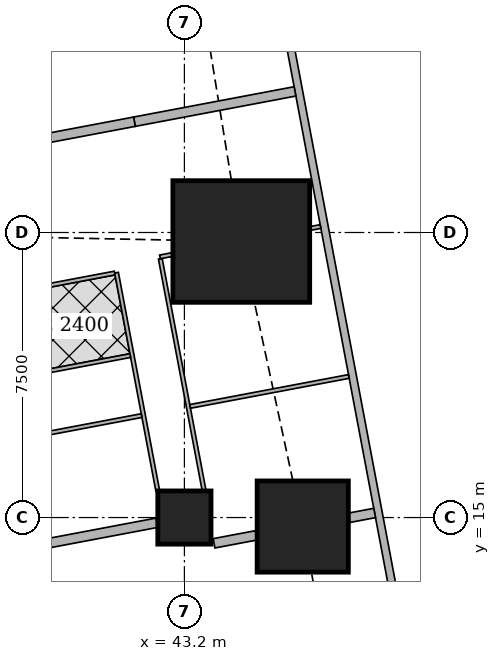
"""IFC4 building model, lengths in metres.
Left out: names, types, materials, properties, quantities, classifications, styles, units other than length and angle.
Written with IfcOpenShell. Run it as: python <this file> out.ifc"""

import sys

from ifc_helpers import new_model, si_unit, direction, frame, frame_2d, origin, origin_2d, place, context, subcontext, project, spatial, rectangle, extrude, element, fill, save


model = new_model("IFC4")
c1 = context("Model", 3, precision=1e-05, world=origin(), true_north=direction((0.0, 1.0)))
c2 = subcontext(c1, "Body", "Model", "MODEL_VIEW")
j1 = project(units=[si_unit("LENGTHUNIT", "METRE"), si_unit("PLANEANGLEUNIT", "RADIAN")], contexts=[c1])
p1 = place(None, origin())
s1 = spatial("IfcSite", under=j1, at=p1, CompositionType="ELEMENT")
p2 = place(p1, origin())
s2 = spatial("IfcBuilding", under=s1, at=p2, CompositionType="ELEMENT")
p3 = place(p2, frame((0.0, 0.0, 193.7)))
s3 = spatial("IfcBuildingStorey", under=s2, at=p3, CompositionType="ELEMENT", Elevation=193.7)
p4 = place(p3, frame((43.2, 15.0, 0.0), z_axis=(0.0, 0.0, 1.0), x_axis=(1.0, 0.0, 0.0)))
e1 = element("IfcColumn", 1, at=p4, inside=s3, PredefinedType="COLUMN", context=c2, shape_type="SweptSolid", body=[
    extrude(rectangle(XDim=1.4, YDim=1.4, at=origin_2d()), origin(), (0.0, 0.0, 1.0), 3.75),
])
p5 = place(p3, frame((46.314, 14.763, 0.0), z_axis=(0.0, 0.0, 1.0), x_axis=(1.0, 0.0, 0.0)))
e2 = element("IfcColumn", 2, at=p5, inside=s3, PredefinedType="COLUMN", context=c2, shape_type="SweptSolid", body=[
    extrude(rectangle(XDim=2.4, YDim=2.4, at=origin_2d()), origin(), (0.0, 0.0, 1.0), 3.75),
])
p6 = place(p3, frame((44.697, 22.263, 0.0), z_axis=(0.0, 0.0, 1.0), x_axis=(1.0, 0.0, 0.0)))
e3 = element("IfcColumn", 3, at=p6, inside=s3, PredefinedType="COLUMN", context=c2, shape_type="SweptSolid", body=[
    extrude(rectangle(XDim=3.6, YDim=3.2, at=origin_2d()), origin(), (0.0, 0.0, 1.0), 3.75),
])
p7 = place(p3, frame((50.653, 2.703, 0.0), z_axis=(0.0, 0.0, 1.0), x_axis=(-0.185612026696, 0.982623109613, 0.0)))
e4 = element("IfcWall", 4, at=p7, inside=s3, PredefinedType="SOLIDWALL", context=c2, shape_type="SweptSolid", body=[
    extrude(rectangle(XDim=41.393, YDim=0.2, at=frame_2d((20.697, 0.0))), origin(), (0.0, 0.0, 1.0), 3.5),
])
p8 = place(p7, frame((1.633, 0.0, 0.9)))
e5 = element("IfcOpeningElement", 5, at=p8, cuts=e4, PredefinedType="OPENING", context=c2, shape_type="SweptSolid", body=[
    extrude(rectangle(XDim=1.8, YDim=1.5, at=frame_2d((0.9, 0.75))), frame((0.0, 0.11, 0.0), z_axis=(0.0, -1.0, 0.0), x_axis=(1.0, 0.0, 0.0)), (0.0, 0.0, 1.0), 0.22),
])
p9 = place(p7, frame((6.032, 0.0, 0.9)))
e6 = element("IfcOpeningElement", 6, at=p9, cuts=e4, PredefinedType="OPENING", context=c2, shape_type="SweptSolid", body=[
    extrude(rectangle(XDim=1.8, YDim=1.5, at=frame_2d((0.9, 0.75))), frame((0.0, 0.11, 0.0), z_axis=(0.0, -1.0, 0.0), x_axis=(1.0, 0.0, 0.0)), (0.0, 0.0, 1.0), 0.22),
])
p10 = place(p7, frame((9.848, 0.0, 0.9)))
e7 = element("IfcOpeningElement", 7, at=p10, cuts=e4, PredefinedType="OPENING", context=c2, shape_type="SweptSolid", body=[
    extrude(rectangle(XDim=1.8, YDim=1.5, at=frame_2d((0.9, 0.75))), frame((0.0, 0.11, 0.0), z_axis=(0.0, -1.0, 0.0), x_axis=(1.0, 0.0, 0.0)), (0.0, 0.0, 1.0), 0.22),
])
p11 = place(p7, frame((13.664, 0.0, 0.9)))
e8 = element("IfcOpeningElement", 8, at=p11, cuts=e4, PredefinedType="OPENING", context=c2, shape_type="SweptSolid", body=[
    extrude(rectangle(XDim=1.8, YDim=1.5, at=frame_2d((0.9, 0.75))), frame((0.0, 0.11, 0.0), z_axis=(0.0, -1.0, 0.0), x_axis=(1.0, 0.0, 0.0)), (0.0, 0.0, 1.0), 0.22),
])
p12 = place(p7, frame((17.481, 0.0, 0.9)))
e9 = element("IfcOpeningElement", 9, at=p12, cuts=e4, PredefinedType="OPENING", context=c2, shape_type="SweptSolid", body=[
    extrude(rectangle(XDim=1.8, YDim=1.5, at=frame_2d((0.9, 0.75))), frame((0.0, 0.11, 0.0), z_axis=(0.0, -1.0, 0.0), x_axis=(1.0, 0.0, 0.0)), (0.0, 0.0, 1.0), 0.22),
])
p13 = place(p7, frame((21.297, 0.0, 0.9)))
e10 = element("IfcOpeningElement", 10, at=p13, cuts=e4, PredefinedType="OPENING", context=c2, shape_type="SweptSolid", body=[
    extrude(rectangle(XDim=1.8, YDim=1.5, at=frame_2d((0.9, 0.75))), frame((0.0, 0.11, 0.0), z_axis=(0.0, -1.0, 0.0), x_axis=(1.0, 0.0, 0.0)), (0.0, 0.0, 1.0), 0.22),
])
p14 = place(p7, frame((25.113, 0.0, 0.9)))
e11 = element("IfcOpeningElement", 11, at=p14, cuts=e4, PredefinedType="OPENING", context=c2, shape_type="SweptSolid", body=[
    extrude(rectangle(XDim=1.8, YDim=1.5, at=frame_2d((0.9, 0.75))), frame((0.0, 0.11, 0.0), z_axis=(0.0, -1.0, 0.0), x_axis=(1.0, 0.0, 0.0)), (0.0, 0.0, 1.0), 0.22),
])
p15 = place(p7, frame((28.93, 0.0, 0.9)))
e12 = element("IfcOpeningElement", 12, at=p15, cuts=e4, PredefinedType="OPENING", context=c2, shape_type="SweptSolid", body=[
    extrude(rectangle(XDim=1.8, YDim=1.5, at=frame_2d((0.9, 0.75))), frame((0.0, 0.11, 0.0), z_axis=(0.0, -1.0, 0.0), x_axis=(1.0, 0.0, 0.0)), (0.0, 0.0, 1.0), 0.22),
])
p16 = place(p7, frame((32.746, 0.0, 0.9)))
e13 = element("IfcOpeningElement", 13, at=p16, cuts=e4, PredefinedType="OPENING", context=c2, shape_type="SweptSolid", body=[
    extrude(rectangle(XDim=1.8, YDim=1.5, at=frame_2d((0.9, 0.75))), frame((0.0, 0.11, 0.0), z_axis=(0.0, -1.0, 0.0), x_axis=(1.0, 0.0, 0.0)), (0.0, 0.0, 1.0), 0.22),
])
p17 = place(p7, frame((36.481, 0.0, 0.9)))
e14 = element("IfcOpeningElement", 14, at=p17, cuts=e4, PredefinedType="OPENING", context=c2, shape_type="SweptSolid", body=[
    extrude(rectangle(XDim=1.8, YDim=1.5, at=frame_2d((0.9, 0.75))), frame((0.0, 0.11, 0.0), z_axis=(0.0, -1.0, 0.0), x_axis=(1.0, 0.0, 0.0)), (0.0, 0.0, 1.0), 0.22),
])
p18 = place(p3, frame((33.933, 42.73, 0.0), z_axis=(0.0, 0.0, 1.0), x_axis=(0.185595417643, -0.982626246825, 0.0)))
e15 = element("IfcWall", 15, at=p18, inside=s3, PredefinedType="SOLIDWALL", context=c2, shape_type="SweptSolid", body=[
    extrude(rectangle(XDim=41.051, YDim=0.15, at=frame_2d((20.525, 0.0))), origin(), (0.0, 0.0, 1.0), 2.5),
])
p19 = place(p18, frame((16.082, 0.0, 0.0)))
e16 = element("IfcOpeningElement", 16, at=p19, cuts=e15, PredefinedType="OPENING", context=c2, shape_type="SweptSolid", body=[
    extrude(rectangle(XDim=1.0, YDim=2.1, at=frame_2d((0.5, 1.05))), frame((0.0, 0.085, 0.0), z_axis=(0.0, -1.0, 0.0), x_axis=(1.0, 0.0, 0.0)), (0.0, 0.0, 1.0), 0.17),
])
p20 = place(p18, frame((19.898, 0.0, 0.0)))
e17 = element("IfcOpeningElement", 17, at=p20, cuts=e15, PredefinedType="OPENING", context=c2, shape_type="SweptSolid", body=[
    extrude(rectangle(XDim=1.0, YDim=2.1, at=frame_2d((0.5, 1.05))), frame((0.0, 0.085, 0.0), z_axis=(0.0, -1.0, 0.0), x_axis=(1.0, 0.0, 0.0)), (0.0, 0.0, 1.0), 0.17),
])
p21 = place(p18, frame((30.862, 0.0, 0.0)))
e18 = element("IfcOpeningElement", 18, at=p21, cuts=e15, PredefinedType="OPENING", context=c2, shape_type="SweptSolid", body=[
    extrude(rectangle(XDim=1.0, YDim=2.1, at=frame_2d((0.5, 1.05))), frame((0.0, 0.085, 0.0), z_axis=(0.0, -1.0, 0.0), x_axis=(1.0, 0.0, 0.0)), (0.0, 0.0, 1.0), 0.17),
])
p22 = place(p3, frame((42.566, 21.809, 0.0), z_axis=(0.0, 0.0, 1.0), x_axis=(0.185613526435, -0.98262282632, 0.0)))
e19 = element("IfcWall", 19, at=p22, inside=s3, PredefinedType="PARTITIONING", context=c2, shape_type="SweptSolid", body=[
    extrude(rectangle(XDim=6.207, YDim=0.1, at=frame_2d((3.104, 0.0))), origin(), (0.0, 0.0, 1.0), 2.5),
])
p23 = place(p22, frame((1.45, 0.0, 0.0)))
e20 = element("IfcOpeningElement", 20, at=p23, cuts=e19, PredefinedType="OPENING", context=c2, shape_type="SweptSolid", body=[
    extrude(rectangle(XDim=0.9, YDim=2.1, at=frame_2d((0.45, 1.05))), frame((0.0, 0.06, 0.0), z_axis=(0.0, -1.0, 0.0), x_axis=(1.0, 0.0, 0.0)), (0.0, 0.0, 1.0), 0.12),
])
p24 = place(p22, frame((4.163, 0.0, 0.0)))
e21 = element("IfcOpeningElement", 21, at=p24, cuts=e19, PredefinedType="OPENING", context=c2, shape_type="SweptSolid", body=[
    extrude(rectangle(XDim=0.9, YDim=2.1, at=frame_2d((0.45, 1.05))), frame((0.0, 0.06, 0.0), z_axis=(0.0, -1.0, 0.0), x_axis=(1.0, 0.0, 0.0)), (0.0, 0.0, 1.0), 0.12),
])
p25 = place(p3, frame((41.414, 21.442, 0.0), z_axis=(0.0, 0.0, 1.0), x_axis=(0.185698675093, -0.982606738257, 0.0)))
e22 = element("IfcWall", 22, at=p25, inside=s3, PredefinedType="PARTITIONING", context=c2, shape_type="SweptSolid", body=[
    extrude(rectangle(XDim=5.843, YDim=0.1, at=frame_2d((2.921, 0.0))), origin(), (0.0, 0.0, 1.0), 3.5),
])
p26 = place(p25, frame((0.655, 0.0, 0.0)))
e23 = element("IfcOpeningElement", 23, at=p26, cuts=e22, PredefinedType="OPENING", context=c2, shape_type="SweptSolid", body=[
    extrude(rectangle(XDim=0.9, YDim=2.1, at=frame_2d((0.45, 1.05))), frame((0.0, 0.06, 0.0), z_axis=(0.0, -1.0, 0.0), x_axis=(1.0, 0.0, 0.0)), (0.0, 0.0, 1.0), 0.12),
])
p27 = place(p25, frame((2.563, 0.0, 0.0)))
e24 = element("IfcOpeningElement", 24, at=p27, cuts=e22, PredefinedType="OPENING", context=c2, shape_type="SweptSolid", body=[
    extrude(rectangle(XDim=0.9, YDim=2.1, at=frame_2d((0.45, 1.05))), frame((0.0, 0.06, 0.0), z_axis=(0.0, -1.0, 0.0), x_axis=(1.0, 0.0, 0.0)), (0.0, 0.0, 1.0), 0.12),
])
p28 = place(p3, frame((46.782, 22.657, 0.0), z_axis=(0.0, 0.0, 1.0), x_axis=(-0.982574553168, -0.185868898601, 0.0)))
e25 = element("IfcWall", 25, at=p28, inside=s3, PredefinedType="PARTITIONING", context=c2, shape_type="SweptSolid", body=[
    extrude(rectangle(XDim=0.28, YDim=0.1, at=frame_2d((0.14, 0.0))), origin(), (0.0, 0.0, 1.0), 3.5),
])
p29 = place(p3, frame((42.887, 21.921, 0.0), z_axis=(0.0, 0.0, 1.0), x_axis=(-0.982274918032, -0.187445953293, 0.0)))
e26 = element("IfcWall", 26, at=p29, inside=s3, PredefinedType="PARTITIONING", context=c2, shape_type="SweptSolid", body=[
    extrude(rectangle(XDim=0.336, YDim=0.1, at=frame_2d((0.168, 0.0))), origin(), (0.0, 0.0, 1.0), 2.5),
])
p30 = place(p3, frame((47.527, 18.712, 0.0), z_axis=(0.0, 0.0, 1.0), x_axis=(-0.982665405803, -0.185387972203, 0.0)))
e27 = element("IfcWall", 27, at=p30, inside=s3, PredefinedType="PARTITIONING", context=c2, shape_type="SweptSolid", body=[
    extrude(rectangle(XDim=4.25, YDim=0.1, at=frame_2d((2.125, 0.0))), origin(), (0.0, 0.0, 1.0), 2.05),
])
p31 = place(p3, frame((41.365, 21.433, 0.0), z_axis=(0.0, 0.0, 1.0), x_axis=(-0.982607026909, -0.185697147715, 0.0)))
e28 = element("IfcWall", 28, at=p31, inside=s3, PredefinedType="PARTITIONING", context=c2, shape_type="SweptSolid", body=[
    extrude(rectangle(XDim=3.275, YDim=0.1, at=frame_2d((1.637, 0.0))), origin(), (0.0, 0.0, 1.0), 3.5),
])
p32 = place(p3, frame((42.073, 17.682, 0.0), z_axis=(0.0, 0.0, 1.0), x_axis=(-0.982620626894, -0.185625169636, 0.0)))
e29 = element("IfcWall", 29, at=p32, inside=s3, PredefinedType="PARTITIONING", context=c2, shape_type="SweptSolid", body=[
    extrude(rectangle(XDim=3.275, YDim=0.1, at=frame_2d((1.637, 0.0))), origin(), (0.0, 0.0, 1.0), 3.5),
])
p33 = place(p32, frame((1.2, 0.0, 0.0)))
e30 = element("IfcOpeningElement", 30, at=p33, cuts=e29, PredefinedType="OPENING", context=c2, shape_type="SweptSolid", body=[
    extrude(rectangle(XDim=0.9, YDim=2.1, at=frame_2d((0.45, 1.05))), frame((0.0, 0.06, 0.0), z_axis=(0.0, -1.0, 0.0), x_axis=(1.0, 0.0, 0.0)), (0.0, 0.0, 1.0), 0.12),
])
p34 = place(p3, frame((41.775, 19.261, 0.0), z_axis=(0.0, 0.0, 1.0), x_axis=(-0.982620626894, -0.185625169636, 0.0)))
e31 = element("IfcWall", 31, at=p34, inside=s3, PredefinedType="PARTITIONING", context=c2, shape_type="SweptSolid", body=[
    extrude(rectangle(XDim=3.275, YDim=0.1, at=frame_2d((1.637, 0.0))), origin(), (0.0, 0.0, 1.0), 3.5),
])
p35 = place(p3, frame((46.11, 26.213, 0.0), z_axis=(0.0, 0.0, 1.0), x_axis=(-0.982633535512, -0.185556823879, 0.0)))
e32 = element("IfcWall", 32, at=p35, inside=s3, PredefinedType="SOLIDWALL", context=c2, shape_type="SweptSolid", body=[
    extrude(rectangle(XDim=4.3, YDim=0.25, at=frame_2d((2.15, 0.0))), origin(), (0.0, 0.0, 1.0), 2.05),
])
p36 = place(p3, frame((41.885, 25.415, 0.0), z_axis=(0.0, 0.0, 1.0), x_axis=(-0.982612837616, -0.185666398014, 0.0)))
e33 = element("IfcWall", 33, at=p36, inside=s3, PredefinedType="SOLIDWALL", context=c2, shape_type="SweptSolid", body=[
    extrude(rectangle(XDim=4.525, YDim=0.25, at=frame_2d((2.262, 0.0))), origin(), (0.0, 0.0, 1.0), 3.5),
])
p37 = place(p3, frame((48.206, 15.12, 0.0), z_axis=(0.0, 0.0, 1.0), x_axis=(-0.982610999048, -0.18567612811, 0.0)))
e34 = element("IfcWall", 34, at=p37, inside=s3, PredefinedType="SOLIDWALL", context=c2, shape_type="SweptSolid", body=[
    extrude(rectangle(XDim=0.68, YDim=0.25, at=frame_2d((0.34, 0.0))), origin(), (0.0, 0.0, 1.0), 2.05),
])
p38 = place(p3, frame((45.09, 14.531, 0.0), z_axis=(0.0, 0.0, 1.0), x_axis=(-0.982737354171, -0.185006196431, 0.0)))
e35 = element("IfcWall", 35, at=p38, inside=s3, PredefinedType="SOLIDWALL", context=c2, shape_type="SweptSolid", body=[
    extrude(rectangle(XDim=1.13, YDim=0.25, at=frame_2d((0.565, 0.0))), origin(), (0.0, 0.0, 1.0), 2.05),
])
p39 = place(p3, frame((42.476, 14.863, 0.0), z_axis=(0.0, 0.0, 1.0), x_axis=(-0.982638716117, -0.185529387398, 0.0)))
e36 = element("IfcWall", 36, at=p39, inside=s3, PredefinedType="SOLIDWALL", context=c2, shape_type="SweptSolid", body=[
    extrude(rectangle(XDim=3.148, YDim=0.25, at=frame_2d((1.574, 0.0))), origin(), (0.0, 0.0, 1.0), 3.5),
])
p40 = place(p10, origin())
e37 = element("IfcWindow", 37, at=p40, inside=s3, PartitioningType="SINGLE_PANEL", PredefinedType="WINDOW", context=c2, shape_type="SweptSolid", body=[
    extrude(rectangle(XDim=1.8, YDim=1.5, at=frame_2d((0.9, 0.75))), frame((0.0, 0.03, 0.0), z_axis=(0.0, -1.0, 0.0), x_axis=(1.0, 0.0, 0.0)), (0.0, 0.0, 1.0), 0.06),
])
fill(e7, e37)
p41 = place(p11, origin())
e38 = element("IfcWindow", 38, at=p41, inside=s3, PartitioningType="SINGLE_PANEL", PredefinedType="WINDOW", context=c2, shape_type="SweptSolid", body=[
    extrude(rectangle(XDim=1.8, YDim=1.5, at=frame_2d((0.9, 0.75))), frame((0.0, 0.03, 0.0), z_axis=(0.0, -1.0, 0.0), x_axis=(1.0, 0.0, 0.0)), (0.0, 0.0, 1.0), 0.06),
])
fill(e8, e38)
p42 = place(p12, origin())
e39 = element("IfcWindow", 39, at=p42, inside=s3, PartitioningType="SINGLE_PANEL", PredefinedType="WINDOW", context=c2, shape_type="SweptSolid", body=[
    extrude(rectangle(XDim=1.8, YDim=1.5, at=frame_2d((0.9, 0.75))), frame((0.0, 0.03, 0.0), z_axis=(0.0, -1.0, 0.0), x_axis=(1.0, 0.0, 0.0)), (0.0, 0.0, 1.0), 0.06),
])
fill(e9, e39)
p43 = place(p13, origin())
e40 = element("IfcWindow", 40, at=p43, inside=s3, PartitioningType="SINGLE_PANEL", PredefinedType="WINDOW", context=c2, shape_type="SweptSolid", body=[
    extrude(rectangle(XDim=1.8, YDim=1.5, at=frame_2d((0.9, 0.75))), frame((0.0, 0.03, 0.0), z_axis=(0.0, -1.0, 0.0), x_axis=(1.0, 0.0, 0.0)), (0.0, 0.0, 1.0), 0.06),
])
fill(e10, e40)
p44 = place(p23, origin())
e41 = element("IfcDoor", 41, at=p44, inside=s3, OperationType="SINGLE_SWING_LEFT", PredefinedType="DOOR", context=c2, shape_type="SweptSolid", body=[
    extrude(rectangle(XDim=0.9, YDim=2.1, at=frame_2d((0.45, 1.05))), frame((0.0, 0.025, 0.0), z_axis=(0.0, -1.0, 0.0), x_axis=(1.0, 0.0, 0.0)), (0.0, 0.0, 1.0), 0.05),
])
fill(e20, e41)
p45 = place(p24, origin())
e42 = element("IfcDoor", 42, at=p45, inside=s3, OperationType="SINGLE_SWING_LEFT", PredefinedType="DOOR", context=c2, shape_type="SweptSolid", body=[
    extrude(rectangle(XDim=0.9, YDim=2.1, at=frame_2d((0.45, 1.05))), frame((0.0, 0.025, 0.0), z_axis=(0.0, -1.0, 0.0), x_axis=(1.0, 0.0, 0.0)), (0.0, 0.0, 1.0), 0.05),
])
fill(e21, e42)
p46 = place(p26, origin())
e43 = element("IfcDoor", 43, at=p46, inside=s3, OperationType="SINGLE_SWING_RIGHT", PredefinedType="DOOR", context=c2, shape_type="SweptSolid", body=[
    extrude(rectangle(XDim=0.9, YDim=2.1, at=frame_2d((0.45, 1.05))), frame((0.0, 0.025, 0.0), z_axis=(0.0, -1.0, 0.0), x_axis=(1.0, 0.0, 0.0)), (0.0, 0.0, 1.0), 0.05),
])
fill(e23, e43)
p47 = place(p27, origin())
e44 = element("IfcDoor", 44, at=p47, inside=s3, OperationType="SINGLE_SWING_LEFT", PredefinedType="DOOR", context=c2, shape_type="SweptSolid", body=[
    extrude(rectangle(XDim=0.9, YDim=2.1, at=frame_2d((0.45, 1.05))), frame((0.0, 0.025, 0.0), z_axis=(0.0, -1.0, 0.0), x_axis=(1.0, 0.0, 0.0)), (0.0, 0.0, 1.0), 0.05),
])
fill(e24, e44)
p48 = place(p33, origin())
e45 = element("IfcDoor", 45, at=p48, inside=s3, OperationType="SINGLE_SWING_LEFT", PredefinedType="DOOR", context=c2, shape_type="SweptSolid", body=[
    extrude(rectangle(XDim=0.9, YDim=2.1, at=frame_2d((0.45, 1.05))), frame((0.0, 0.025, 0.0), z_axis=(0.0, -1.0, 0.0), x_axis=(1.0, 0.0, 0.0)), (0.0, 0.0, 1.0), 0.05),
])
fill(e30, e45)
save(model, sys.argv[1])
